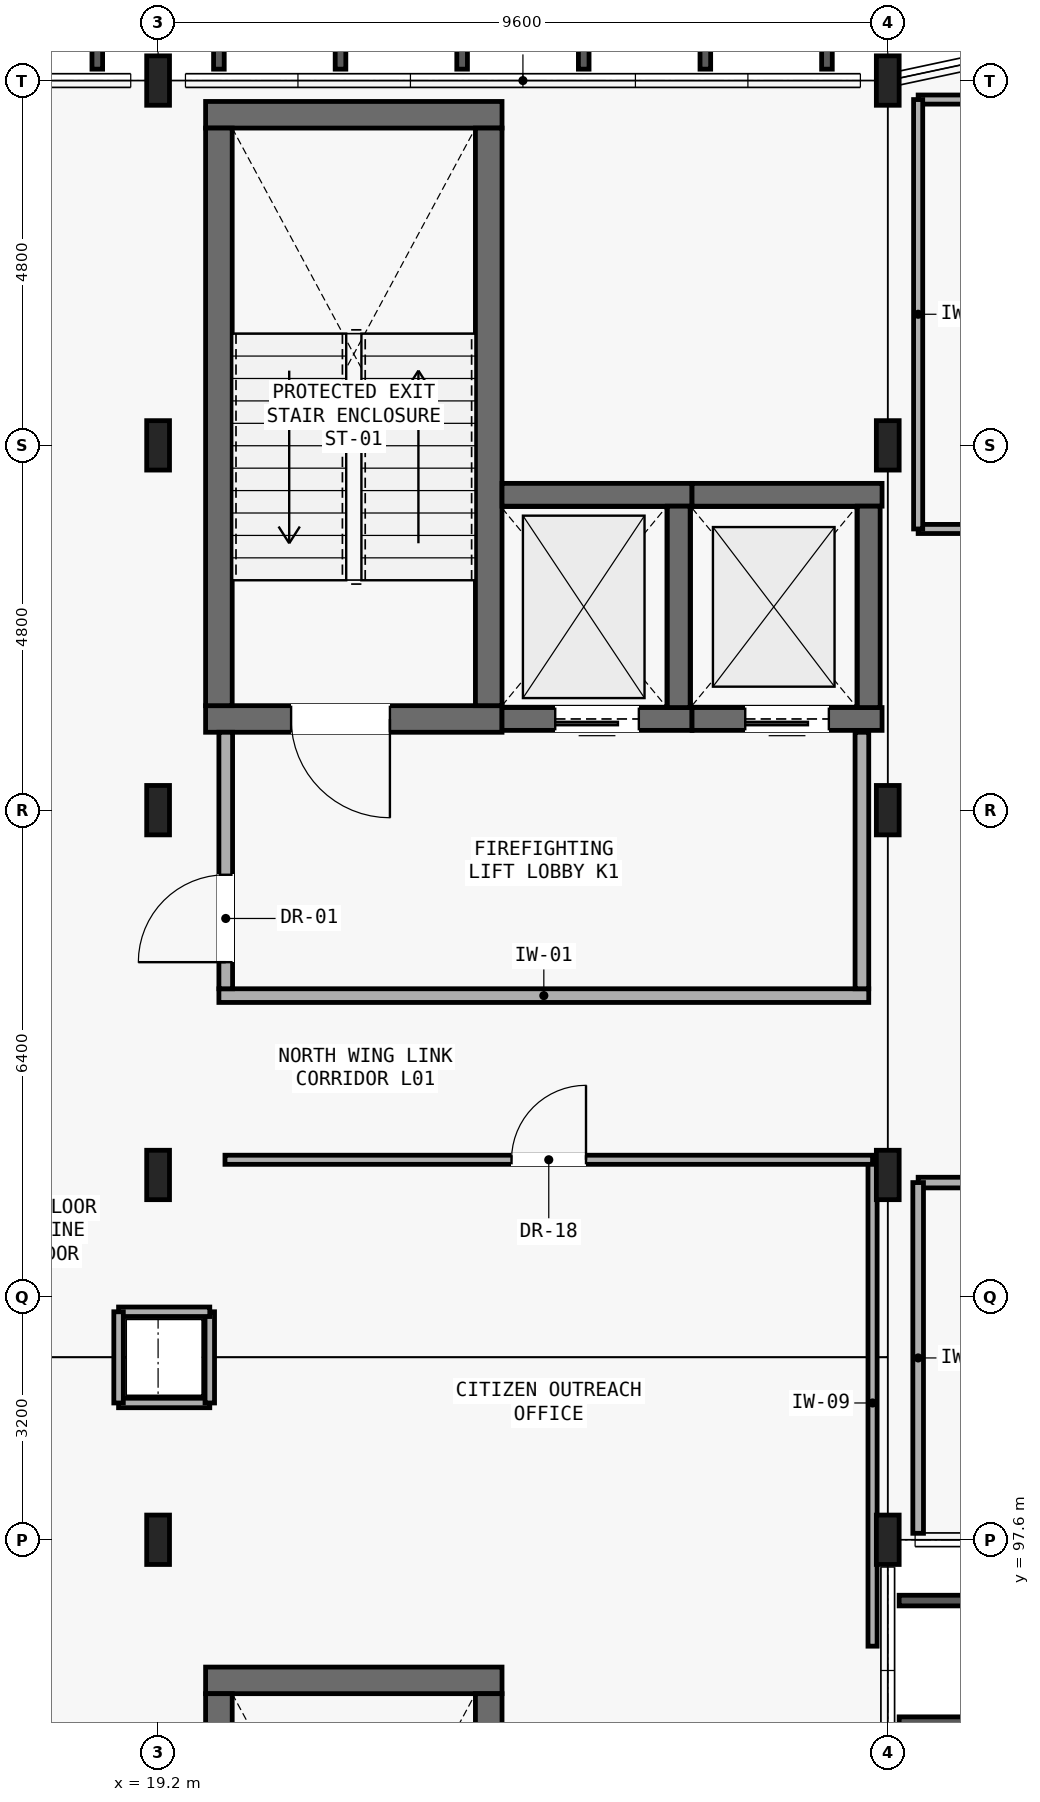
"""IFC4 building model, lengths in metres.
Left out: names, types, materials, properties, quantities, classifications, styles, units other than length and angle.
Written with IfcOpenShell. Run it as: python <this file> out.ifc"""

import sys

from ifc_helpers import new_model, si_unit, direction, frame, frame_2d, origin, origin_2d, place, context, subcontext, project, spatial, rectangle, i_section, extrude, element, fill, save


model = new_model("IFC4")
c1 = context("Model", 3, precision=1e-05, world=origin(), true_north=direction((0.0, 1.0)))
c2 = subcontext(c1, "Body", "Model", "MODEL_VIEW")
j1 = project(units=[si_unit("LENGTHUNIT", "METRE"), si_unit("PLANEANGLEUNIT", "RADIAN")], contexts=[c1])
p1 = place(None, origin())
s1 = spatial("IfcSite", under=j1, at=p1, CompositionType="ELEMENT")
p2 = place(p1, origin())
s2 = spatial("IfcBuilding", under=s1, at=p2, CompositionType="ELEMENT")
p3 = place(p2, frame((0.0, 0.0, 5.25)))
s3 = spatial("IfcBuildingStorey", under=s2, at=p3, CompositionType="ELEMENT", Elevation=5.25)
for number, where, z_axis, x_axis in (
    (1, (28.8, 97.6, 0.0), (0.0, 0.0, 1.0), (1.0, 0.0, 0.0)),
    (2, (28.8, 102.4, 0.0), (0.0, 0.0, 1.0), (1.0, 0.0, 0.0)),
    (3, (28.8, 107.2, 0.0), (0.0, 0.0, 1.0), (1.0, 0.0, 0.0)),
    (4, (28.8, 112.0, 0.0), (0.0, 0.0, 1.0), (1.0, 0.0, 0.0)),
    (5, (28.8, 116.8, 0.0), (0.0, 0.0, 1.0), (1.0, 0.0, 0.0)),
    (6, (19.2, 116.8, 0.0), (0.0, 0.0, 1.0), (1.0, 0.0, 0.0)),
    (7, (19.2, 97.6, 0.0), (0.0, 0.0, 1.0), (1.0, 0.0, 0.0)),
    (8, (19.2, 102.4, 0.0), (0.0, 0.0, 1.0), (1.0, 0.0, 0.0)),
    (9, (19.2, 107.2, 0.0), (0.0, 0.0, 1.0), (1.0, 0.0, 0.0)),
    (10, (19.2, 112.0, 0.0), (0.0, 0.0, 1.0), (1.0, 0.0, 0.0)),
):
    element("IfcColumn", number, at=place(p3, frame(where, z_axis=z_axis, x_axis=x_axis)), inside=s3, PredefinedType="COLUMN", context=c2, shape_type="SweptSolid", body=[
        extrude(i_section(OverallWidth=0.3, OverallDepth=0.65, WebThickness=0.016, FlangeThickness=0.031, FilletRadius=0.027, at=origin_2d()), origin(), (0.0, 0.0, 1.0), 4.2),
    ])
p4 = place(p3, frame((19.825, 108.4, 0.0), z_axis=(0.0, 0.0, 1.0), x_axis=(1.0, 0.0, 0.0)))
e11 = element("IfcWall", 11, at=p4, inside=s3, PredefinedType="SHEAR", context=c2, shape_type="SweptSolid", body=[
    extrude(rectangle(XDim=3.9, YDim=0.35, at=frame_2d((1.95, 0.0))), origin(), (0.0, 0.0, 1.0), 3.96),
])
p5 = place(p4, frame((1.125, 0.0, 0.0)))
e12 = element("IfcOpeningElement", 12, at=p5, cuts=e11, PredefinedType="OPENING", context=c2, shape_type="SweptSolid", body=[
    extrude(rectangle(XDim=1.3, YDim=2.15, at=frame_2d((0.65, 1.075))), frame((0.0, 0.185, 0.0), z_axis=(0.0, -1.0, 0.0), x_axis=(1.0, 0.0, 0.0)), (0.0, 0.0, 1.0), 0.37),
])
p6 = place(p3, frame((19.825, 116.35, 0.0), z_axis=(0.0, 0.0, 1.0), x_axis=(1.0, 0.0, 0.0)))
e13 = element("IfcWall", 13, at=p6, inside=s3, PredefinedType="SHEAR", context=c2, shape_type="SweptSolid", body=[
    extrude(rectangle(XDim=3.9, YDim=0.35, at=frame_2d((1.95, 0.0))), origin(), (0.0, 0.0, 1.0), 3.96),
])
for number, where, z_axis, x_axis in (
    (14, (20.0, 108.575, 0.0), (0.0, 0.0, 1.0), (0.0, 1.0, 0.0)),
    (15, (23.55, 108.575, 0.0), (0.0, 0.0, 1.0), (0.0, 1.0, 0.0)),
):
    element("IfcWall", number, at=place(p3, frame(where, z_axis=z_axis, x_axis=x_axis)), inside=s3, PredefinedType="SHEAR", context=c2, shape_type="SweptSolid", body=[
        extrude(rectangle(XDim=7.6, YDim=0.35, at=frame_2d((3.8, 0.0))), origin(), (0.0, 0.0, 1.0), 3.96),
    ])
p7 = place(p3, frame((23.725, 108.4, 0.0), z_axis=(0.0, 0.0, 1.0), x_axis=(1.0, 0.0, 0.0)))
e16 = element("IfcWall", 16, at=p7, inside=s3, PredefinedType="SHEAR", context=c2, shape_type="SweptSolid", body=[
    extrude(rectangle(XDim=2.5, YDim=0.3, at=frame_2d((1.25, 0.0))), origin(), (0.0, 0.0, 1.0), 3.96),
])
p8 = place(p7, frame((0.7, 0.0, 0.0)))
e17 = element("IfcOpeningElement", 17, at=p8, cuts=e16, PredefinedType="OPENING", context=c2, shape_type="SweptSolid", body=[
    extrude(rectangle(XDim=1.1, YDim=2.1, at=frame_2d((0.55, 1.05))), frame((0.0, 0.16, 0.0), z_axis=(0.0, -1.0, 0.0), x_axis=(1.0, 0.0, 0.0)), (0.0, 0.0, 1.0), 0.32),
])
p9 = place(p3, frame((23.725, 111.35, 0.0), z_axis=(0.0, 0.0, 1.0), x_axis=(1.0, 0.0, 0.0)))
e18 = element("IfcWall", 18, at=p9, inside=s3, PredefinedType="SHEAR", context=c2, shape_type="SweptSolid", body=[
    extrude(rectangle(XDim=2.5, YDim=0.3, at=frame_2d((1.25, 0.0))), origin(), (0.0, 0.0, 1.0), 3.96),
])
p10 = place(p3, frame((26.05, 108.55, 0.0), z_axis=(0.0, 0.0, 1.0), x_axis=(0.0, 1.0, 0.0)))
e19 = element("IfcWall", 19, at=p10, inside=s3, PredefinedType="SHEAR", context=c2, shape_type="SweptSolid", body=[
    extrude(rectangle(XDim=2.65, YDim=0.3, at=frame_2d((1.325, 0.0))), origin(), (0.0, 0.0, 1.0), 3.96),
])
p11 = place(p3, frame((26.225, 108.4, 0.0), z_axis=(0.0, 0.0, 1.0), x_axis=(1.0, 0.0, 0.0)))
e20 = element("IfcWall", 20, at=p11, inside=s3, PredefinedType="SHEAR", context=c2, shape_type="SweptSolid", body=[
    extrude(rectangle(XDim=2.5, YDim=0.3, at=frame_2d((1.25, 0.0))), origin(), (0.0, 0.0, 1.0), 3.96),
])
p12 = place(p11, frame((0.7, 0.0, 0.0)))
e21 = element("IfcOpeningElement", 21, at=p12, cuts=e20, PredefinedType="OPENING", context=c2, shape_type="SweptSolid", body=[
    extrude(rectangle(XDim=1.1, YDim=2.1, at=frame_2d((0.55, 1.05))), frame((0.0, 0.16, 0.0), z_axis=(0.0, -1.0, 0.0), x_axis=(1.0, 0.0, 0.0)), (0.0, 0.0, 1.0), 0.32),
])
p13 = place(p3, frame((26.225, 111.35, 0.0), z_axis=(0.0, 0.0, 1.0), x_axis=(1.0, 0.0, 0.0)))
e22 = element("IfcWall", 22, at=p13, inside=s3, PredefinedType="SHEAR", context=c2, shape_type="SweptSolid", body=[
    extrude(rectangle(XDim=2.5, YDim=0.3, at=frame_2d((1.25, 0.0))), origin(), (0.0, 0.0, 1.0), 3.96),
])
p14 = place(p3, frame((28.55, 108.55, 0.0), z_axis=(0.0, 0.0, 1.0), x_axis=(0.0, 1.0, 0.0)))
e23 = element("IfcWall", 23, at=p14, inside=s3, PredefinedType="SHEAR", context=c2, shape_type="SweptSolid", body=[
    extrude(rectangle(XDim=2.65, YDim=0.3, at=frame_2d((1.325, 0.0))), origin(), (0.0, 0.0, 1.0), 3.96),
])
p15 = place(p3, frame((20.0, 104.76, 0.0), z_axis=(0.0, 0.0, 1.0), x_axis=(1.0, 0.0, 0.0)))
e24 = element("IfcWall", 24, at=p15, inside=s3, PredefinedType="PARTITIONING", context=c2, shape_type="SweptSolid", body=[
    extrude(rectangle(XDim=8.55, YDim=0.18, at=frame_2d((4.275, 0.0))), origin(), (0.0, 0.0, 1.0), 3.44),
])
p16 = place(p3, frame((20.09, 104.85, 0.0), z_axis=(0.0, 0.0, 1.0), x_axis=(0.0, 1.0, 0.0)))
e25 = element("IfcWall", 25, at=p16, inside=s3, PredefinedType="PARTITIONING", context=c2, shape_type="SweptSolid", body=[
    extrude(rectangle(XDim=3.375, YDim=0.18, at=frame_2d((1.688, 0.0))), origin(), (0.0, 0.0, 1.0), 3.96),
])
p17 = place(p16, frame((0.35, 0.0, 0.0)))
e26 = element("IfcOpeningElement", 26, at=p17, cuts=e25, PredefinedType="OPENING", context=c2, shape_type="SweptSolid", body=[
    extrude(rectangle(XDim=1.15, YDim=2.15, at=frame_2d((0.575, 1.075))), frame((0.0, 0.1, 0.0), z_axis=(0.0, -1.0, 0.0), x_axis=(1.0, 0.0, 0.0)), (0.0, 0.0, 1.0), 0.2),
])
p18 = place(p3, frame((28.46, 104.85, 0.0), z_axis=(0.0, 0.0, 1.0), x_axis=(0.0, 1.0, 0.0)))
e27 = element("IfcWall", 27, at=p18, inside=s3, PredefinedType="PARTITIONING", context=c2, shape_type="SweptSolid", body=[
    extrude(rectangle(XDim=3.375, YDim=0.18, at=frame_2d((1.688, 0.0))), origin(), (0.0, 0.0, 1.0), 3.96),
])
p19 = place(p3, frame((19.825, 95.75, 0.0), z_axis=(0.0, 0.0, 1.0), x_axis=(1.0, 0.0, 0.0)))
e28 = element("IfcWall", 28, at=p19, inside=s3, PredefinedType="SHEAR", context=c2, shape_type="SweptSolid", body=[
    extrude(rectangle(XDim=3.9, YDim=0.35, at=frame_2d((1.95, 0.0))), origin(), (0.0, 0.0, 1.0), 3.96),
])
for number, where, z_axis, x_axis in (
    (29, (20.0, 87.975, 0.0), (0.0, 0.0, 1.0), (0.0, 1.0, 0.0)),
    (30, (23.55, 87.975, 0.0), (0.0, 0.0, 1.0), (0.0, 1.0, 0.0)),
):
    element("IfcWall", number, at=place(p3, frame(where, z_axis=z_axis, x_axis=x_axis)), inside=s3, PredefinedType="SHEAR", context=c2, shape_type="SweptSolid", body=[
        extrude(rectangle(XDim=7.6, YDim=0.35, at=frame_2d((3.8, 0.0))), origin(), (0.0, 0.0, 1.0), 3.96),
    ])
p20 = place(p3, frame((18.68, 99.4, 0.0), z_axis=(0.0, 0.0, 1.0), x_axis=(1.0, 0.0, 0.0)))
e31 = element("IfcWall", 31, at=p20, inside=s3, PredefinedType="PARTITIONING", context=c2, shape_type="SweptSolid", body=[
    extrude(rectangle(XDim=1.2, YDim=0.125, at=frame_2d((0.6, 0.0))), origin(), (0.0, 0.0, 1.0), 3.96),
])
p21 = place(p3, frame((19.88, 99.4, 0.0), z_axis=(0.0, 0.0, 1.0), x_axis=(0.0, 1.0, 0.0)))
e32 = element("IfcWall", 32, at=p21, inside=s3, PredefinedType="PARTITIONING", context=c2, shape_type="SweptSolid", body=[
    extrude(rectangle(XDim=1.2, YDim=0.125, at=frame_2d((0.6, 0.0))), origin(), (0.0, 0.0, 1.0), 3.96),
])
p22 = place(p3, frame((19.88, 100.6, 0.0), z_axis=(0.0, 0.0, 1.0), x_axis=(-1.0, 0.0, 0.0)))
e33 = element("IfcWall", 33, at=p22, inside=s3, PredefinedType="PARTITIONING", context=c2, shape_type="SweptSolid", body=[
    extrude(rectangle(XDim=1.2, YDim=0.125, at=frame_2d((0.6, 0.0))), origin(), (0.0, 0.0, 1.0), 3.96),
])
p23 = place(p3, frame((18.68, 100.6, 0.0), z_axis=(0.0, 0.0, 1.0), x_axis=(0.0, -1.0, 0.0)))
e34 = element("IfcWall", 34, at=p23, inside=s3, PredefinedType="PARTITIONING", context=c2, shape_type="SweptSolid", body=[
    extrude(rectangle(XDim=1.2, YDim=0.125, at=frame_2d((0.6, 0.0))), origin(), (0.0, 0.0, 1.0), 3.96),
])
p24 = place(p3, frame((28.6, 96.2, 0.0), z_axis=(0.0, 0.0, 1.0), x_axis=(0.0, 1.0, 0.0)))
e35 = element("IfcWall", 35, at=p24, inside=s3, PredefinedType="PARTITIONING", context=c2, shape_type="SweptSolid", body=[
    extrude(rectangle(XDim=6.4, YDim=0.12, at=frame_2d((3.2, 0.0))), origin(), (0.0, 0.0, 1.0), 3.4),
])
p25 = place(p3, frame((28.6, 102.6, 0.0), z_axis=(0.0, 0.0, 1.0), x_axis=(-1.0, 0.0, 0.0)))
e36 = element("IfcWall", 36, at=p25, inside=s3, PredefinedType="PARTITIONING", context=c2, shape_type="SweptSolid", body=[
    extrude(rectangle(XDim=8.52, YDim=0.12, at=frame_2d((4.26, 0.0))), origin(), (0.0, 0.0, 1.0), 3.14),
])
p26 = place(p25, frame((3.77, 0.0, 0.0)))
e37 = element("IfcOpeningElement", 37, at=p26, cuts=e36, PredefinedType="OPENING", context=c2, shape_type="SweptSolid", body=[
    extrude(rectangle(XDim=0.98, YDim=2.1, at=frame_2d((0.49, 1.05))), frame((0.0, 0.07, 0.0), z_axis=(0.0, -1.0, 0.0), x_axis=(1.0, 0.0, 0.0)), (0.0, 0.0, 1.0), 0.14),
])
p27 = place(p3, frame((29.2, 110.9, 0.0), z_axis=(0.0, 0.0, 1.0), x_axis=(1.0, 0.0, 0.0)))
e38 = element("IfcWall", 38, at=p27, inside=s3, PredefinedType="PARTITIONING", context=c2, shape_type="SweptSolid", body=[
    extrude(rectangle(XDim=28.4, YDim=0.12, at=frame_2d((14.2, 0.0))), origin(), (0.0, 0.0, 1.0), 3.96),
])
p28 = place(p27, frame((13.69, 0.0, 0.0)))
e39 = element("IfcOpeningElement", 39, at=p28, cuts=e38, PredefinedType="OPENING", context=c2, shape_type="SweptSolid", body=[
    extrude(rectangle(XDim=1.02, YDim=2.1, at=frame_2d((0.51, 1.05))), frame((0.0, 0.07, 0.0), z_axis=(0.0, -1.0, 0.0), x_axis=(1.0, 0.0, 0.0)), (0.0, 0.0, 1.0), 0.14),
])
p29 = place(p3, frame((57.6, 116.55, 0.0), z_axis=(0.0, 0.0, 1.0), x_axis=(-1.0, 0.0, 0.0)))
e40 = element("IfcWall", 40, at=p29, inside=s3, PredefinedType="PARTITIONING", context=c2, shape_type="SweptSolid", body=[
    extrude(rectangle(XDim=28.4, YDim=0.12, at=frame_2d((14.2, 0.0))), origin(), (0.0, 0.0, 1.0), 3.63),
])
p30 = place(p3, frame((29.2, 116.55, 0.0), z_axis=(0.0, 0.0, 1.0), x_axis=(0.0, -1.0, 0.0)))
e41 = element("IfcWall", 41, at=p30, inside=s3, PredefinedType="PARTITIONING", context=c2, shape_type="SweptSolid", body=[
    extrude(rectangle(XDim=5.65, YDim=0.12, at=frame_2d((2.825, 0.0))), origin(), (0.0, 0.0, 1.0), 3.96),
])
p31 = place(p3, frame((57.6, 102.3, 0.0), z_axis=(0.0, 0.0, 1.0), x_axis=(-1.0, 0.0, 0.0)))
e42 = element("IfcWall", 42, at=p31, inside=s3, PredefinedType="PARTITIONING", context=c2, shape_type="SweptSolid", body=[
    extrude(rectangle(XDim=28.4, YDim=0.14, at=frame_2d((14.2, 0.0))), origin(), (0.0, 0.0, 1.0), 3.4),
])
p32 = place(p31, frame((13.68, 0.0, 0.0)))
e43 = element("IfcOpeningElement", 43, at=p32, cuts=e42, PredefinedType="OPENING", context=c2, shape_type="SweptSolid", body=[
    extrude(rectangle(XDim=1.04, YDim=2.08, at=frame_2d((0.52, 1.04))), frame((0.0, 0.08, 0.0), z_axis=(0.0, -1.0, 0.0), x_axis=(1.0, 0.0, 0.0)), (0.0, 0.0, 1.0), 0.16),
])
p33 = place(p3, frame((29.2, 102.3, 0.0), z_axis=(0.0, 0.0, 1.0), x_axis=(0.0, -1.0, 0.0)))
e44 = element("IfcWall", 44, at=p33, inside=s3, PredefinedType="PARTITIONING", context=c2, shape_type="SweptSolid", body=[
    extrude(rectangle(XDim=4.615, YDim=0.14, at=frame_2d((2.308, 0.0))), origin(), (0.0, 0.0, 1.0), 3.96),
])
p34 = place(p5, frame((1.3, 0.0, 0.0), z_axis=(0.0, 0.0, 1.0), x_axis=(-1.0, 0.0, 0.0)))
e45 = element("IfcDoor", 45, at=p34, inside=s3, OperationType="SINGLE_SWING_RIGHT", PredefinedType="DOOR", context=c2, shape_type="SweptSolid", body=[
    extrude(rectangle(XDim=1.3, YDim=2.15, at=frame_2d((0.65, 1.075))), frame((0.0, 0.025, 0.0), z_axis=(0.0, -1.0, 0.0), x_axis=(1.0, 0.0, 0.0)), (0.0, 0.0, 1.0), 0.05),
])
fill(e12, e45)
p35 = place(p8, frame((1.1, 0.0, 0.0), z_axis=(0.0, 0.0, 1.0), x_axis=(-1.0, 0.0, 0.0)))
e46 = element("IfcDoor", 46, at=p35, inside=s3, OperationType="SLIDING_TO_LEFT", PredefinedType="DOOR", context=c2, shape_type="SweptSolid", body=[
    extrude(rectangle(XDim=1.1, YDim=2.1, at=frame_2d((0.55, 1.05))), frame((0.0, 0.025, 0.0), z_axis=(0.0, -1.0, 0.0), x_axis=(1.0, 0.0, 0.0)), (0.0, 0.0, 1.0), 0.05),
])
fill(e17, e46)
p36 = place(p12, frame((1.1, 0.0, 0.0), z_axis=(0.0, 0.0, 1.0), x_axis=(-1.0, 0.0, 0.0)))
e47 = element("IfcDoor", 47, at=p36, inside=s3, OperationType="SLIDING_TO_LEFT", PredefinedType="DOOR", context=c2, shape_type="SweptSolid", body=[
    extrude(rectangle(XDim=1.1, YDim=2.1, at=frame_2d((0.55, 1.05))), frame((0.0, 0.025, 0.0), z_axis=(0.0, -1.0, 0.0), x_axis=(1.0, 0.0, 0.0)), (0.0, 0.0, 1.0), 0.05),
])
fill(e21, e47)
p37 = place(p17, origin())
e48 = element("IfcDoor", 48, at=p37, inside=s3, OperationType="SINGLE_SWING_LEFT", PredefinedType="DOOR", context=c2, shape_type="SweptSolid", body=[
    extrude(rectangle(XDim=1.15, YDim=2.15, at=frame_2d((0.575, 1.075))), frame((0.0, 0.025, 0.0), z_axis=(0.0, -1.0, 0.0), x_axis=(1.0, 0.0, 0.0)), (0.0, 0.0, 1.0), 0.05),
])
fill(e26, e48)
p38 = place(p26, frame((0.98, 0.0, 0.0), z_axis=(0.0, 0.0, 1.0), x_axis=(-1.0, 0.0, 0.0)))
e49 = element("IfcDoor", 49, at=p38, inside=s3, OperationType="SINGLE_SWING_LEFT", PredefinedType="DOOR", context=c2, shape_type="SweptSolid", body=[
    extrude(rectangle(XDim=0.98, YDim=2.1, at=frame_2d((0.49, 1.05))), frame((0.0, 0.025, 0.0), z_axis=(0.0, -1.0, 0.0), x_axis=(1.0, 0.0, 0.0)), (0.0, 0.0, 1.0), 0.05),
])
fill(e37, e49)
save(model, sys.argv[1])
